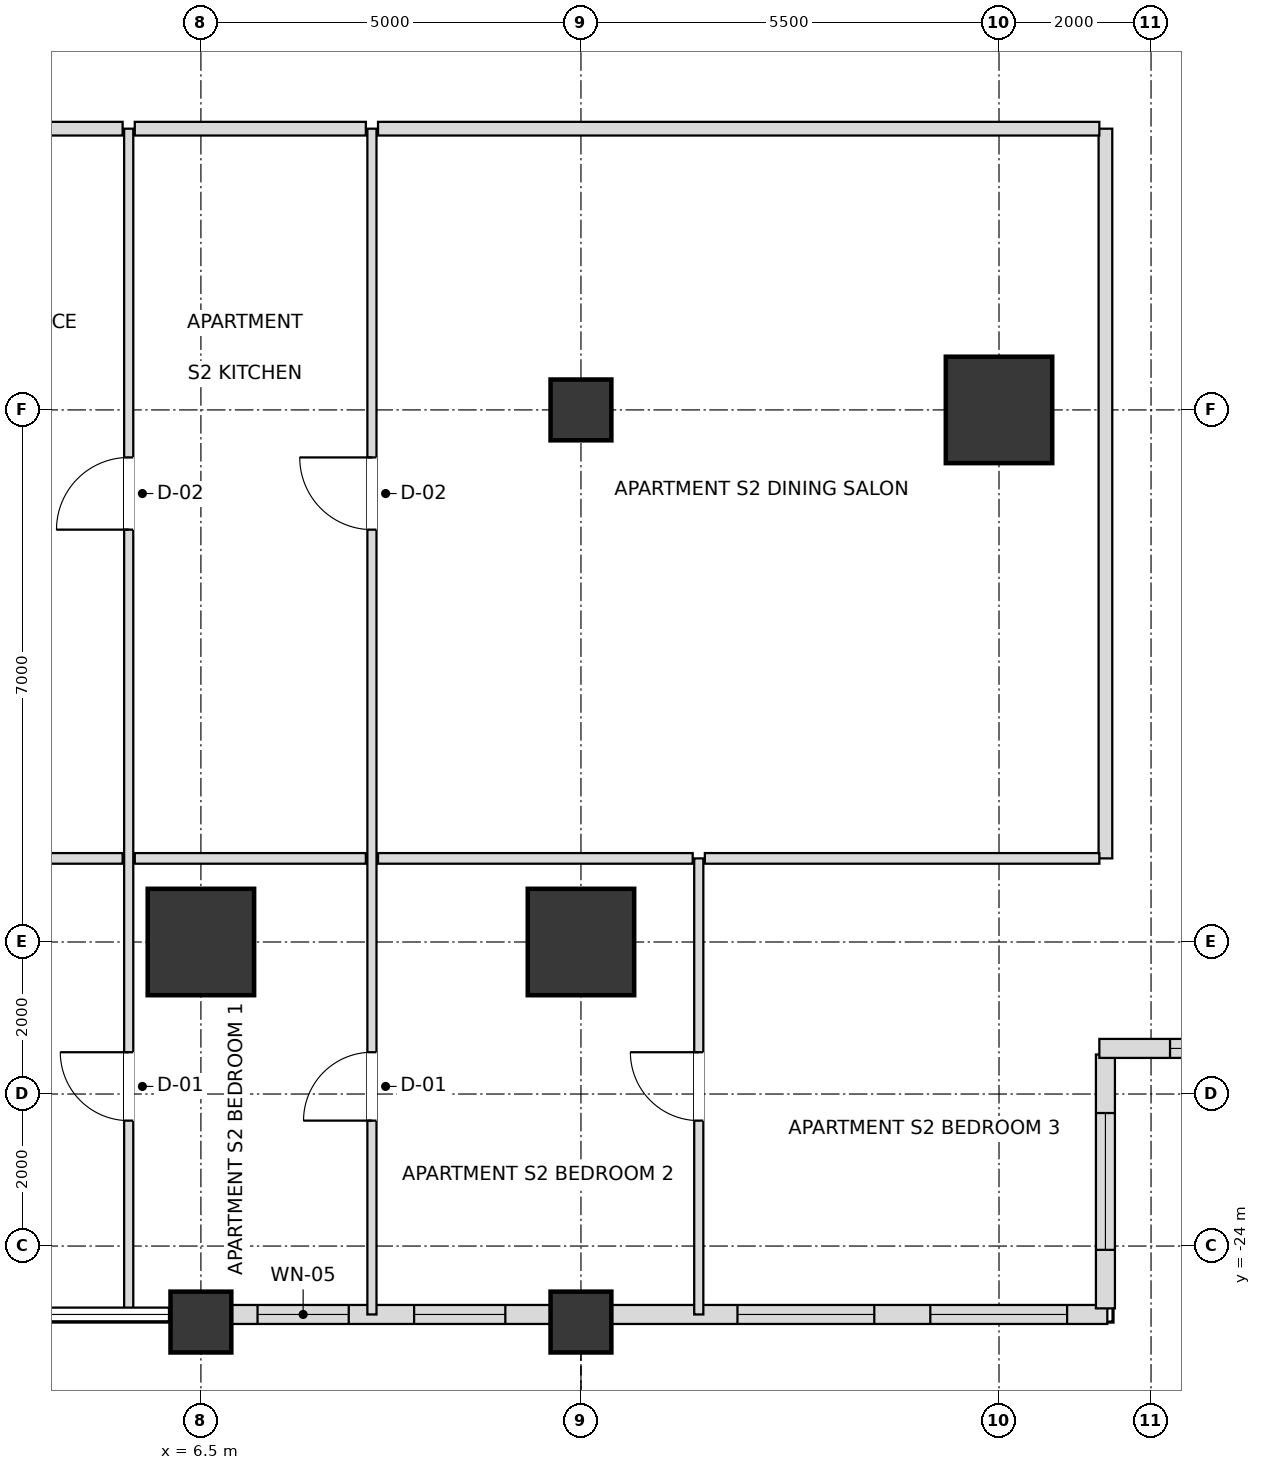
"""IFC4 building model, lengths in metres.
Left out: names, types, materials, properties, quantities, classifications, styles, units other than length and angle.
Written with IfcOpenShell. Run it as: python <this file> out.ifc"""

import sys

from ifc_helpers import new_model, si_unit, direction, frame, frame_2d, origin, origin_2d, place, context, subcontext, project, spatial, rectangle, extrude, element, fill, save


model = new_model("IFC4")
c1 = context("Model", 3, precision=1e-05, world=origin(), true_north=direction((0.0, 1.0)))
c2 = subcontext(c1, "Body", "Model", "MODEL_VIEW")
j1 = project(units=[si_unit("LENGTHUNIT", "METRE"), si_unit("PLANEANGLEUNIT", "RADIAN")], contexts=[c1])
p1 = place(None, origin())
s1 = spatial("IfcSite", under=j1, at=p1, CompositionType="ELEMENT")
p2 = place(p1, origin())
s2 = spatial("IfcBuilding", under=s1, at=p2, CompositionType="ELEMENT")
p3 = place(p2, frame((0.0, 0.0, 72.0)))
s3 = spatial("IfcBuildingStorey", under=s2, at=p3, CompositionType="ELEMENT", Elevation=72.0)
for number, where, z_axis, x_axis in (
    (1, (6.5, -20.0, 0.0), (0.0, 0.0, 1.0), (1.0, 0.0, 0.0)),
    (2, (11.5, -20.0, 0.0), (0.0, 0.0, 1.0), (1.0, 0.0, 0.0)),
    (3, (17.0, -13.0, 0.0), (0.0, 0.0, 1.0), (1.0, 0.0, 0.0)),
):
    element("IfcColumn", number, at=place(p3, frame(where, z_axis=z_axis, x_axis=x_axis)), inside=s3, PredefinedType="USERDEFINED", context=c2, shape_type="SweptSolid", body=[
        extrude(rectangle(XDim=1.4, YDim=1.4, at=origin_2d()), origin(), (0.0, 0.0, 1.0), 3.6),
    ])
for number, where, z_axis, x_axis in (
    (4, (11.5, -13.0, 0.0), (0.0, 0.0, 1.0), (1.0, 0.0, 0.0)),
    (5, (6.5, -25.0, 0.0), (0.0, 0.0, 1.0), (1.0, 0.0, 0.0)),
    (6, (11.5, -25.0, 0.0), (0.0, 0.0, 1.0), (1.0, 0.0, 0.0)),
):
    element("IfcColumn", number, at=place(p3, frame(where, z_axis=z_axis, x_axis=x_axis)), inside=s3, PredefinedType="COLUMN", context=c2, shape_type="SweptSolid", body=[
        extrude(rectangle(XDim=0.8, YDim=0.8, at=origin_2d()), origin(), (0.0, 0.0, 1.0), 3.6),
    ])
p4 = place(p3, frame((6.895, -24.9, 0.0), z_axis=(0.0, 0.0, 1.0), x_axis=(1.0, 0.0, 0.0)))
e7 = element("IfcWall", 7, at=p4, inside=s3, PredefinedType="SOLIDWALL", context=c2, shape_type="SweptSolid", body=[
    extrude(rectangle(XDim=4.21, YDim=0.25, at=frame_2d((2.105, 0.0))), origin(), (0.0, 0.0, 1.0), 2.736),
])
p5 = place(p4, frame((0.35, 0.0, 0.72)))
e8 = element("IfcOpeningElement", 8, at=p5, cuts=e7, PredefinedType="OPENING", context=c2, shape_type="SweptSolid", body=[
    extrude(rectangle(XDim=1.2, YDim=1.68, at=frame_2d((0.6, 0.84))), frame((0.0, 0.135, 0.0), z_axis=(0.0, -1.0, 0.0), x_axis=(1.0, 0.0, 0.0)), (0.0, 0.0, 1.0), 0.27),
])
p6 = place(p4, frame((2.41, 0.0, 0.72)))
e9 = element("IfcOpeningElement", 9, at=p6, cuts=e7, PredefinedType="OPENING", context=c2, shape_type="SweptSolid", body=[
    extrude(rectangle(XDim=1.2, YDim=1.68, at=frame_2d((0.6, 0.84))), frame((0.0, 0.135, 0.0), z_axis=(0.0, -1.0, 0.0), x_axis=(1.0, 0.0, 0.0)), (0.0, 0.0, 1.0), 0.27),
])
p7 = place(p3, frame((11.895, -24.9, 0.0), z_axis=(0.0, 0.0, 1.0), x_axis=(1.0, 0.0, 0.0)))
e10 = element("IfcWall", 10, at=p7, inside=s3, PredefinedType="SOLIDWALL", context=c2, shape_type="SweptSolid", body=[
    extrude(rectangle(XDim=6.53, YDim=0.25, at=frame_2d((3.265, 0.0))), origin(), (0.0, 0.0, 1.0), 2.736),
])
p8 = place(p7, frame((1.664, 0.0, 0.72)))
e11 = element("IfcOpeningElement", 11, at=p8, cuts=e10, PredefinedType="OPENING", context=c2, shape_type="SweptSolid", body=[
    extrude(rectangle(XDim=1.8, YDim=1.68, at=frame_2d((0.9, 0.84))), frame((0.0, 0.135, 0.0), z_axis=(0.0, -1.0, 0.0), x_axis=(1.0, 0.0, 0.0)), (0.0, 0.0, 1.0), 0.27),
])
p9 = place(p7, frame((4.201, 0.0, 0.72)))
e12 = element("IfcOpeningElement", 12, at=p9, cuts=e10, PredefinedType="OPENING", context=c2, shape_type="SweptSolid", body=[
    extrude(rectangle(XDim=1.8, YDim=1.68, at=frame_2d((0.9, 0.84))), frame((0.0, 0.135, 0.0), z_axis=(0.0, -1.0, 0.0), x_axis=(1.0, 0.0, 0.0)), (0.0, 0.0, 1.0), 0.27),
])
p10 = place(p3, frame((18.4, -24.82, 0.0), z_axis=(0.0, 0.0, 1.0), x_axis=(0.0, 1.0, 0.0)))
e13 = element("IfcWall", 13, at=p10, inside=s3, PredefinedType="SOLIDWALL", context=c2, shape_type="SweptSolid", body=[
    extrude(rectangle(XDim=3.34, YDim=0.25, at=frame_2d((1.67, 0.0))), origin(), (0.0, 0.0, 1.0), 2.736),
])
p11 = place(p10, frame((0.77, 0.0, 0.72)))
e14 = element("IfcOpeningElement", 14, at=p11, cuts=e13, PredefinedType="OPENING", context=c2, shape_type="SweptSolid", body=[
    extrude(rectangle(XDim=1.8, YDim=1.68, at=frame_2d((0.9, 0.84))), frame((0.0, 0.135, 0.0), z_axis=(0.0, -1.0, 0.0), x_axis=(1.0, 0.0, 0.0)), (0.0, 0.0, 1.0), 0.27),
])
p12 = place(p3, frame((18.32, -21.4, 0.0), z_axis=(0.0, 0.0, 1.0), x_axis=(1.0, 0.0, 0.0)))
e15 = element("IfcWall", 15, at=p12, inside=s3, PredefinedType="SOLIDWALL", context=c2, shape_type="SweptSolid", body=[
    extrude(rectangle(XDim=3.66, YDim=0.25, at=frame_2d((1.83, 0.0))), origin(), (0.0, 0.0, 1.0), 2.736),
])
p13 = place(p12, frame((0.93, 0.0, 0.72)))
e16 = element("IfcOpeningElement", 16, at=p13, cuts=e15, PredefinedType="OPENING", context=c2, shape_type="SweptSolid", body=[
    extrude(rectangle(XDim=1.8, YDim=1.68, at=frame_2d((0.9, 0.84))), frame((0.0, 0.135, 0.0), z_axis=(0.0, -1.0, 0.0), x_axis=(1.0, 0.0, 0.0)), (0.0, 0.0, 1.0), 0.27),
])
p14 = place(p3, frame((5.55, -24.9, 0.0), z_axis=(0.0, 0.0, 1.0), x_axis=(0.0, 1.0, 0.0)))
e17 = element("IfcWall", 17, at=p14, inside=s3, PredefinedType="PARTITIONING", context=c2, shape_type="SweptSolid", body=[
    extrude(rectangle(XDim=15.6, YDim=0.12, at=frame_2d((7.8, 0.0))), origin(), (0.0, 0.0, 1.0), 2.816),
])
p15 = place(p14, frame((10.325, 0.0, 0.0)))
e18 = element("IfcOpeningElement", 18, at=p15, cuts=e17, PredefinedType="OPENING", context=c2, shape_type="SweptSolid", body=[
    extrude(rectangle(XDim=0.95, YDim=2.1, at=frame_2d((0.475, 1.05))), frame((0.0, 0.07, 0.0), z_axis=(0.0, -1.0, 0.0), x_axis=(1.0, 0.0, 0.0)), (0.0, 0.0, 1.0), 0.14),
])
p16 = place(p14, frame((2.55, 0.0, 0.0)))
e19 = element("IfcOpeningElement", 19, at=p16, cuts=e17, PredefinedType="OPENING", context=c2, shape_type="SweptSolid", body=[
    extrude(rectangle(XDim=0.9, YDim=2.1, at=frame_2d((0.45, 1.05))), frame((0.0, 0.07, 0.0), z_axis=(0.0, -1.0, 0.0), x_axis=(1.0, 0.0, 0.0)), (0.0, 0.0, 1.0), 0.14),
])
p17 = place(p3, frame((8.75, -24.9, 0.0), z_axis=(0.0, 0.0, 1.0), x_axis=(0.0, 1.0, 0.0)))
e20 = element("IfcWall", 20, at=p17, inside=s3, PredefinedType="PARTITIONING", context=c2, shape_type="SweptSolid", body=[
    extrude(rectangle(XDim=15.6, YDim=0.12, at=frame_2d((7.8, 0.0))), origin(), (0.0, 0.0, 1.0), 2.816),
])
p18 = place(p17, frame((10.325, 0.0, 0.0)))
e21 = element("IfcOpeningElement", 21, at=p18, cuts=e20, PredefinedType="OPENING", context=c2, shape_type="SweptSolid", body=[
    extrude(rectangle(XDim=0.95, YDim=2.1, at=frame_2d((0.475, 1.05))), frame((0.0, 0.07, 0.0), z_axis=(0.0, -1.0, 0.0), x_axis=(1.0, 0.0, 0.0)), (0.0, 0.0, 1.0), 0.14),
])
p19 = place(p17, frame((2.55, 0.0, 0.0)))
e22 = element("IfcOpeningElement", 22, at=p19, cuts=e20, PredefinedType="OPENING", context=c2, shape_type="SweptSolid", body=[
    extrude(rectangle(XDim=0.9, YDim=2.1, at=frame_2d((0.45, 1.05))), frame((0.0, 0.07, 0.0), z_axis=(0.0, -1.0, 0.0), x_axis=(1.0, 0.0, 0.0)), (0.0, 0.0, 1.0), 0.14),
])
p20 = place(p3, frame((13.05, -24.9, 0.0), z_axis=(0.0, 0.0, 1.0), x_axis=(0.0, 1.0, 0.0)))
e23 = element("IfcWall", 23, at=p20, inside=s3, PredefinedType="PARTITIONING", context=c2, shape_type="SweptSolid", body=[
    extrude(rectangle(XDim=6.0, YDim=0.12, at=frame_2d((3.0, 0.0))), origin(), (0.0, 0.0, 1.0), 2.736),
])
p21 = place(p20, frame((2.55, 0.0, 0.0)))
e24 = element("IfcOpeningElement", 24, at=p21, cuts=e23, PredefinedType="OPENING", context=c2, shape_type="SweptSolid", body=[
    extrude(rectangle(XDim=0.9, YDim=2.1, at=frame_2d((0.45, 1.05))), frame((0.0, 0.07, 0.0), z_axis=(0.0, -1.0, 0.0), x_axis=(1.0, 0.0, 0.0)), (0.0, 0.0, 1.0), 0.14),
])
p22 = place(p3, frame((18.4, -18.9, 0.0), z_axis=(0.0, 0.0, 1.0), x_axis=(0.0, 1.0, 0.0)))
e25 = element("IfcWall", 25, at=p22, inside=s3, PredefinedType="PARTITIONING", context=c2, shape_type="SweptSolid", body=[
    extrude(rectangle(XDim=9.6, YDim=0.18, at=frame_2d((4.8, 0.0))), origin(), (0.0, 0.0, 1.0), 2.736),
])
p23 = place(p3, frame((1.43, -18.9, 0.0), z_axis=(0.0, 0.0, 1.0), x_axis=(1.0, 0.0, 0.0)))
e26 = element("IfcWall", 26, at=p23, inside=s3, PredefinedType="PARTITIONING", context=c2, shape_type="SweptSolid", body=[
    extrude(rectangle(XDim=4.04, YDim=0.14, at=frame_2d((2.02, 0.0))), origin(), (0.0, 0.0, 1.0), 3.38),
])
p24 = place(p23, frame((1.545, 0.0, 0.0)))
e27 = element("IfcOpeningElement", 27, at=p24, cuts=e26, PredefinedType="OPENING", context=c2, shape_type="SweptSolid", body=[
    extrude(rectangle(XDim=0.95, YDim=2.1, at=frame_2d((0.475, 1.05))), frame((0.0, 0.08, 0.0), z_axis=(0.0, -1.0, 0.0), x_axis=(1.0, 0.0, 0.0)), (0.0, 0.0, 1.0), 0.16),
])
p25 = place(p3, frame((5.63, -18.9, 0.0), z_axis=(0.0, 0.0, 1.0), x_axis=(1.0, 0.0, 0.0)))
e28 = element("IfcWall", 28, at=p25, inside=s3, PredefinedType="PARTITIONING", context=c2, shape_type="SweptSolid", body=[
    extrude(rectangle(XDim=3.04, YDim=0.14, at=frame_2d((1.52, 0.0))), origin(), (0.0, 0.0, 1.0), 2.816),
])
p26 = place(p3, frame((8.83, -18.9, 0.0), z_axis=(0.0, 0.0, 1.0), x_axis=(1.0, 0.0, 0.0)))
e29 = element("IfcWall", 29, at=p26, inside=s3, PredefinedType="PARTITIONING", context=c2, shape_type="SweptSolid", body=[
    extrude(rectangle(XDim=4.14, YDim=0.14, at=frame_2d((2.07, 0.0))), origin(), (0.0, 0.0, 1.0), 2.736),
])
p27 = place(p3, frame((13.13, -18.9, 0.0), z_axis=(0.0, 0.0, 1.0), x_axis=(1.0, 0.0, 0.0)))
e30 = element("IfcWall", 30, at=p27, inside=s3, PredefinedType="PARTITIONING", context=c2, shape_type="SweptSolid", body=[
    extrude(rectangle(XDim=5.19, YDim=0.14, at=frame_2d((2.595, 0.0))), origin(), (0.0, 0.0, 1.0), 2.736),
])
p28 = place(p3, frame((1.43, -9.3, 0.0), z_axis=(0.0, 0.0, 1.0), x_axis=(1.0, 0.0, 0.0)))
e31 = element("IfcWall", 31, at=p28, inside=s3, PredefinedType="PARTITIONING", context=c2, shape_type="SweptSolid", body=[
    extrude(rectangle(XDim=4.04, YDim=0.18, at=frame_2d((2.02, 0.0))), origin(), (0.0, 0.0, 1.0), 3.38),
])
p29 = place(p28, frame((1.545, 0.0, 0.0)))
e32 = element("IfcOpeningElement", 32, at=p29, cuts=e31, PredefinedType="OPENING", context=c2, shape_type="SweptSolid", body=[
    extrude(rectangle(XDim=0.95, YDim=2.15, at=frame_2d((0.475, 1.075))), frame((0.0, 0.1, 0.0), z_axis=(0.0, -1.0, 0.0), x_axis=(1.0, 0.0, 0.0)), (0.0, 0.0, 1.0), 0.2),
])
p30 = place(p3, frame((5.63, -9.3, 0.0), z_axis=(0.0, 0.0, 1.0), x_axis=(1.0, 0.0, 0.0)))
e33 = element("IfcWall", 33, at=p30, inside=s3, PredefinedType="PARTITIONING", context=c2, shape_type="SweptSolid", body=[
    extrude(rectangle(XDim=3.04, YDim=0.18, at=frame_2d((1.52, 0.0))), origin(), (0.0, 0.0, 1.0), 2.816),
])
p31 = place(p3, frame((8.83, -9.3, 0.0), z_axis=(0.0, 0.0, 1.0), x_axis=(1.0, 0.0, 0.0)))
e34 = element("IfcWall", 34, at=p31, inside=s3, PredefinedType="PARTITIONING", context=c2, shape_type="SweptSolid", body=[
    extrude(rectangle(XDim=9.49, YDim=0.18, at=frame_2d((4.745, 0.0))), origin(), (0.0, 0.0, 1.0), 2.816),
])
p32 = place(p5, origin())
e35 = element("IfcWindow", 35, at=p32, inside=s3, PartitioningType="SINGLE_PANEL", PredefinedType="WINDOW", context=c2, shape_type="SweptSolid", body=[
    extrude(rectangle(XDim=1.2, YDim=1.68, at=frame_2d((0.6, 0.84))), frame((0.0, 0.03, 0.0), z_axis=(0.0, -1.0, 0.0), x_axis=(1.0, 0.0, 0.0)), (0.0, 0.0, 1.0), 0.06),
])
fill(e8, e35)
p33 = place(p6, origin())
e36 = element("IfcWindow", 36, at=p33, inside=s3, PartitioningType="SINGLE_PANEL", PredefinedType="WINDOW", context=c2, shape_type="SweptSolid", body=[
    extrude(rectangle(XDim=1.2, YDim=1.68, at=frame_2d((0.6, 0.84))), frame((0.0, 0.03, 0.0), z_axis=(0.0, -1.0, 0.0), x_axis=(1.0, 0.0, 0.0)), (0.0, 0.0, 1.0), 0.06),
])
fill(e9, e36)
p34 = place(p8, origin())
e37 = element("IfcWindow", 37, at=p34, inside=s3, PartitioningType="SINGLE_PANEL", PredefinedType="WINDOW", context=c2, shape_type="SweptSolid", body=[
    extrude(rectangle(XDim=1.8, YDim=1.68, at=frame_2d((0.9, 0.84))), frame((0.0, 0.03, 0.0), z_axis=(0.0, -1.0, 0.0), x_axis=(1.0, 0.0, 0.0)), (0.0, 0.0, 1.0), 0.06),
])
fill(e11, e37)
p35 = place(p9, origin())
e38 = element("IfcWindow", 38, at=p35, inside=s3, PartitioningType="SINGLE_PANEL", PredefinedType="WINDOW", context=c2, shape_type="SweptSolid", body=[
    extrude(rectangle(XDim=1.8, YDim=1.68, at=frame_2d((0.9, 0.84))), frame((0.0, 0.03, 0.0), z_axis=(0.0, -1.0, 0.0), x_axis=(1.0, 0.0, 0.0)), (0.0, 0.0, 1.0), 0.06),
])
fill(e12, e38)
p36 = place(p11, origin())
e39 = element("IfcWindow", 39, at=p36, inside=s3, PartitioningType="SINGLE_PANEL", PredefinedType="WINDOW", context=c2, shape_type="SweptSolid", body=[
    extrude(rectangle(XDim=1.8, YDim=1.68, at=frame_2d((0.9, 0.84))), frame((0.0, 0.03, 0.0), z_axis=(0.0, -1.0, 0.0), x_axis=(1.0, 0.0, 0.0)), (0.0, 0.0, 1.0), 0.06),
])
fill(e14, e39)
p37 = place(p13, origin())
e40 = element("IfcWindow", 40, at=p37, inside=s3, PartitioningType="SINGLE_PANEL", PredefinedType="WINDOW", context=c2, shape_type="SweptSolid", body=[
    extrude(rectangle(XDim=1.8, YDim=1.68, at=frame_2d((0.9, 0.84))), frame((0.0, 0.03, 0.0), z_axis=(0.0, -1.0, 0.0), x_axis=(1.0, 0.0, 0.0)), (0.0, 0.0, 1.0), 0.06),
])
fill(e16, e40)
p38 = place(p15, origin())
e41 = element("IfcDoor", 41, at=p38, inside=s3, OperationType="SINGLE_SWING_LEFT", PredefinedType="DOOR", context=c2, shape_type="SweptSolid", body=[
    extrude(rectangle(XDim=0.95, YDim=2.1, at=frame_2d((0.475, 1.05))), frame((0.0, 0.025, 0.0), z_axis=(0.0, -1.0, 0.0), x_axis=(1.0, 0.0, 0.0)), (0.0, 0.0, 1.0), 0.05),
])
fill(e18, e41)
p39 = place(p18, origin())
e42 = element("IfcDoor", 42, at=p39, inside=s3, OperationType="SINGLE_SWING_RIGHT", PredefinedType="DOOR", context=c2, shape_type="SweptSolid", body=[
    extrude(rectangle(XDim=0.95, YDim=2.1, at=frame_2d((0.475, 1.05))), frame((0.0, 0.025, 0.0), z_axis=(0.0, -1.0, 0.0), x_axis=(1.0, 0.0, 0.0)), (0.0, 0.0, 1.0), 0.05),
])
fill(e21, e42)
p40 = place(p16, origin())
e43 = element("IfcDoor", 43, at=p40, inside=s3, OperationType="SINGLE_SWING_RIGHT", PredefinedType="DOOR", context=c2, shape_type="SweptSolid", body=[
    extrude(rectangle(XDim=0.9, YDim=2.1, at=frame_2d((0.45, 1.05))), frame((0.0, 0.025, 0.0), z_axis=(0.0, -1.0, 0.0), x_axis=(1.0, 0.0, 0.0)), (0.0, 0.0, 1.0), 0.05),
])
fill(e19, e43)
p41 = place(p19, origin())
e44 = element("IfcDoor", 44, at=p41, inside=s3, OperationType="SINGLE_SWING_LEFT", PredefinedType="DOOR", context=c2, shape_type="SweptSolid", body=[
    extrude(rectangle(XDim=0.9, YDim=2.1, at=frame_2d((0.45, 1.05))), frame((0.0, 0.025, 0.0), z_axis=(0.0, -1.0, 0.0), x_axis=(1.0, 0.0, 0.0)), (0.0, 0.0, 1.0), 0.05),
])
fill(e22, e44)
p42 = place(p21, origin())
e45 = element("IfcDoor", 45, at=p42, inside=s3, OperationType="SINGLE_SWING_RIGHT", PredefinedType="DOOR", context=c2, shape_type="SweptSolid", body=[
    extrude(rectangle(XDim=0.9, YDim=2.1, at=frame_2d((0.45, 1.05))), frame((0.0, 0.025, 0.0), z_axis=(0.0, -1.0, 0.0), x_axis=(1.0, 0.0, 0.0)), (0.0, 0.0, 1.0), 0.05),
])
fill(e24, e45)
save(model, sys.argv[1])
